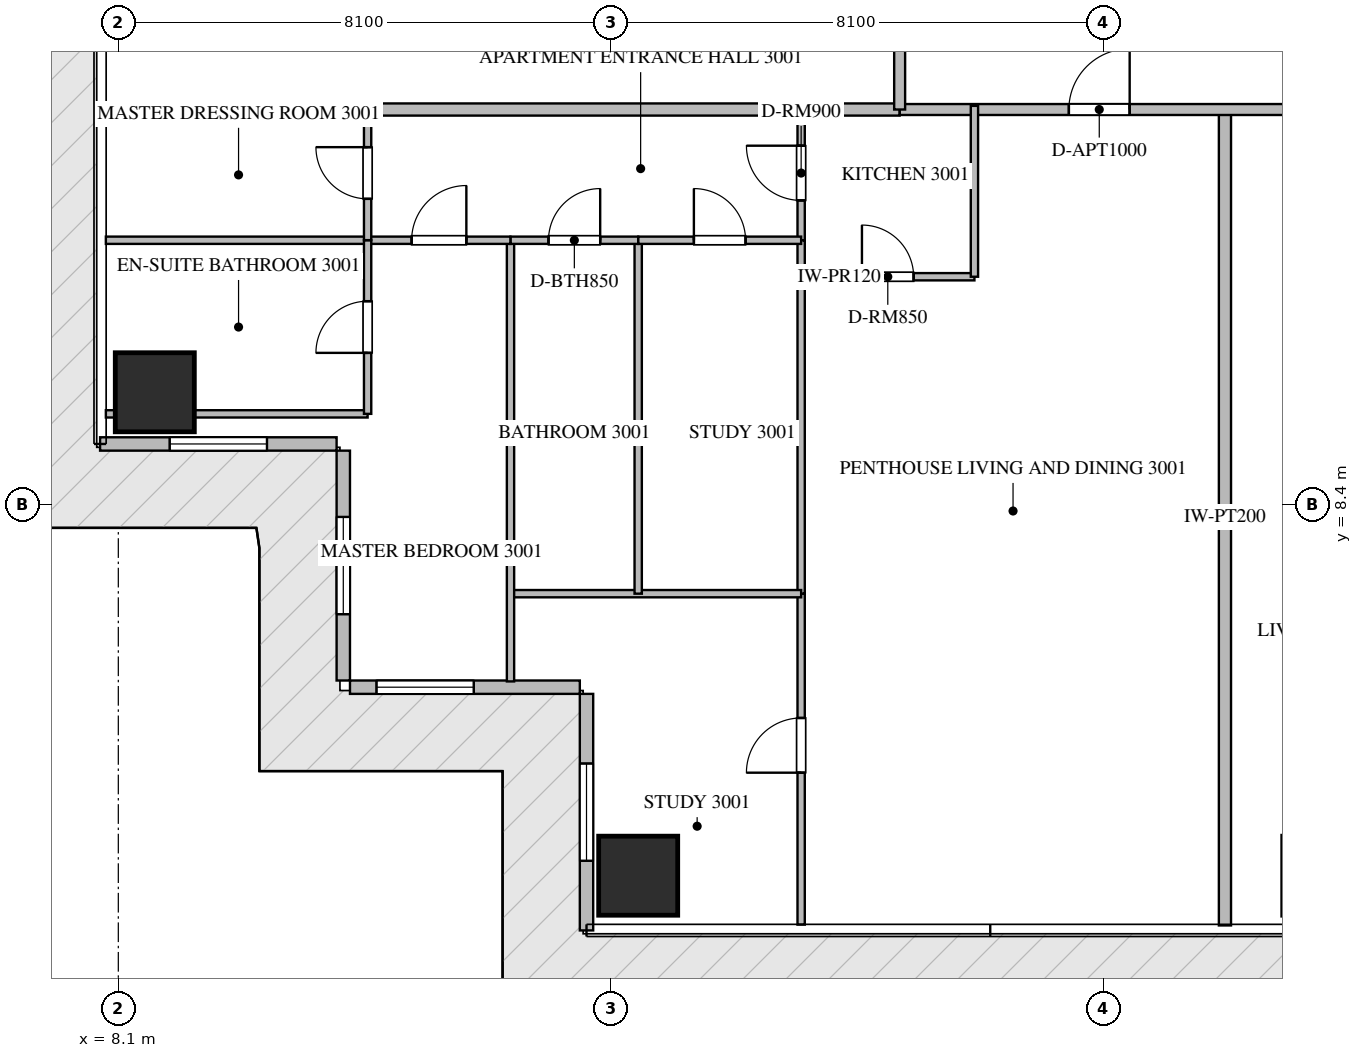
"""IFC4 building model, lengths in metres.
Left out: names, types, materials, properties, quantities, classifications, styles, units other than length and angle.
Written with IfcOpenShell. Run it as: python <this file> out.ifc"""

import sys

from ifc_helpers import new_model, si_unit, direction, frame, frame_2d, origin, origin_2d, place, context, subcontext, project, spatial, rectangle, extrude, source, transform, mapped, element, fill, save


model = new_model("IFC4")
c1 = context("Model", 3, precision=1e-05, world=origin(), true_north=direction((0.0, 1.0)))
c2 = subcontext(c1, "Body", "Model", "MODEL_VIEW")
j1 = project(units=[si_unit("LENGTHUNIT", "METRE"), si_unit("PLANEANGLEUNIT", "RADIAN")], contexts=[c1])
p1 = place(None, origin())
s1 = spatial("IfcSite", under=j1, at=p1, CompositionType="ELEMENT")
p2 = place(p1, origin())
s2 = spatial("IfcBuilding", under=s1, at=p2, CompositionType="ELEMENT")
p3 = place(p2, frame((0.0, 0.0, 123.9)))
s3 = spatial("IfcBuildingStorey", under=s2, at=p3, CompositionType="ELEMENT", Elevation=123.9)
m1 = source(origin(), c2, "Body", "SweptSolid", [
    extrude(rectangle(XDim=1.3, YDim=1.3, at=origin_2d()), origin(), (0.0, 0.0, 1.0), 3.75),
])
for number, where, z_axis, x_axis in (
    (1, (16.65, 2.3, -0.26), (0.0, 0.0, 1.0), (1.0, 0.0, 0.0)),
    (2, (8.7, 10.25, -0.26), (0.0, 0.0, 1.0), (1.0, 0.0, 0.0)),
):
    element("IfcColumn", number, at=place(p3, frame(where, z_axis=z_axis, x_axis=x_axis)), inside=s3, PredefinedType="COLUMN", context=c2, shape_type="MappedRepresentation", body=[
        mapped(m1, transform((0.0, 0.0, 0.0), scale=1.0)),
    ])
p4 = place(p3, frame((7.8, 9.4, 0.0), z_axis=(0.0, 0.0, 1.0), x_axis=(1.0, 0.0, 0.0)))
e3 = element("IfcWall", 3, at=p4, inside=s3, PredefinedType="ELEMENTEDWALL", context=c2, shape_type="SweptSolid", body=[
    extrude(rectangle(XDim=3.89, YDim=0.22, at=frame_2d((1.945, 0.0))), origin(), (0.0, 0.0, 1.0), 3.475),
])
p5 = place(p4, frame((1.145, 0.0, 0.65)))
e4 = element("IfcOpeningElement", 4, at=p5, cuts=e3, PredefinedType="OPENING", context=c2, shape_type="SweptSolid", body=[
    extrude(rectangle(XDim=1.6, YDim=2.1, at=frame_2d((0.8, 1.05))), frame((0.0, 0.12, 0.0), z_axis=(0.0, -1.0, 0.0), x_axis=(1.0, 0.0, 0.0)), (0.0, 0.0, 1.0), 0.24),
])
p6 = place(p3, frame((11.8, 9.29, 0.0), z_axis=(0.0, 0.0, 1.0), x_axis=(0.0, -1.0, 0.0)))
e5 = element("IfcWall", 5, at=p6, inside=s3, PredefinedType="ELEMENTEDWALL", context=c2, shape_type="SweptSolid", body=[
    extrude(rectangle(XDim=3.78, YDim=0.22, at=frame_2d((1.89, 0.0))), origin(), (0.0, 0.0, 1.0), 3.475),
])
p7 = place(p6, frame((1.09, 0.0, 0.65)))
e6 = element("IfcOpeningElement", 6, at=p7, cuts=e5, PredefinedType="OPENING", context=c2, shape_type="SweptSolid", body=[
    extrude(rectangle(XDim=1.6, YDim=2.1, at=frame_2d((0.8, 1.05))), frame((0.0, 0.12, 0.0), z_axis=(0.0, -1.0, 0.0), x_axis=(1.0, 0.0, 0.0)), (0.0, 0.0, 1.0), 0.24),
])
p8 = place(p3, frame((11.91, 5.4, 0.0), z_axis=(0.0, 0.0, 1.0), x_axis=(1.0, 0.0, 0.0)))
e7 = element("IfcWall", 7, at=p8, inside=s3, PredefinedType="ELEMENTEDWALL", context=c2, shape_type="SweptSolid", body=[
    extrude(rectangle(XDim=3.78, YDim=0.22, at=frame_2d((1.89, 0.0))), origin(), (0.0, 0.0, 1.0), 3.475),
])
p9 = place(p8, frame((0.436, 0.0, 0.65)))
e8 = element("IfcOpeningElement", 8, at=p9, cuts=e7, PredefinedType="OPENING", context=c2, shape_type="SweptSolid", body=[
    extrude(rectangle(XDim=1.6, YDim=2.1, at=frame_2d((0.8, 1.05))), frame((0.0, 0.12, 0.0), z_axis=(0.0, -1.0, 0.0), x_axis=(1.0, 0.0, 0.0)), (0.0, 0.0, 1.0), 0.24),
])
p10 = place(p3, frame((15.8, 5.29, 0.0), z_axis=(0.0, 0.0, 1.0), x_axis=(0.0, -1.0, 0.0)))
e9 = element("IfcWall", 9, at=p10, inside=s3, PredefinedType="ELEMENTEDWALL", context=c2, shape_type="SweptSolid", body=[
    extrude(rectangle(XDim=3.89, YDim=0.22, at=frame_2d((1.945, 0.0))), origin(), (0.0, 0.0, 1.0), 3.475),
])
p11 = place(p10, frame((1.145, 0.0, 0.65)))
e10 = element("IfcOpeningElement", 10, at=p11, cuts=e9, PredefinedType="OPENING", context=c2, shape_type="SweptSolid", body=[
    extrude(rectangle(XDim=1.6, YDim=2.1, at=frame_2d((0.8, 1.05))), frame((0.0, 0.12, 0.0), z_axis=(0.0, -1.0, 0.0), x_axis=(1.0, 0.0, 0.0)), (0.0, 0.0, 1.0), 0.24),
])
p12 = place(p3, frame((26.3, 1.482, 0.0), z_axis=(0.0, 0.0, 1.0), x_axis=(0.0, 1.0, 0.0)))
e11 = element("IfcWall", 11, at=p12, inside=s3, PredefinedType="PARTITIONING", context=c2, shape_type="SweptSolid", body=[
    extrude(rectangle(XDim=13.418, YDim=0.2, at=frame_2d((6.709, 0.0))), origin(), (0.0, 0.0, 1.0), 3.49),
])
p13 = place(p3, frame((7.882, 14.9, 0.0), z_axis=(0.0, 0.0, 1.0), x_axis=(1.0, 0.0, 0.0)))
e12 = element("IfcWall", 12, at=p13, inside=s3, PredefinedType="PARTITIONING", context=c2, shape_type="SweptSolid", body=[
    extrude(rectangle(XDim=13.068, YDim=0.2, at=frame_2d((6.534, 0.0))), origin(), (0.0, 0.0, 1.0), 3.49),
])
p14 = place(p3, frame((20.952, 14.9, 0.0), z_axis=(0.0, 0.0, 1.0), x_axis=(1.0, 0.0, 0.0)))
e13 = element("IfcWall", 13, at=p14, inside=s3, PredefinedType="PARTITIONING", context=c2, shape_type="SweptSolid", body=[
    extrude(rectangle(XDim=22.896, YDim=0.18, at=frame_2d((11.448, 0.0))), origin(), (0.0, 0.0, 1.0), 3.49),
])
p15 = place(p14, frame((2.781, 0.0, 0.0)))
e14 = element("IfcOpeningElement", 14, at=p15, cuts=e13, PredefinedType="OPENING", context=c2, shape_type="SweptSolid", body=[
    extrude(rectangle(XDim=1.0, YDim=2.15, at=frame_2d((0.5, 1.075))), frame((0.0, 0.1, 0.0), z_axis=(0.0, -1.0, 0.0), x_axis=(1.0, 0.0, 0.0)), (0.0, 0.0, 1.0), 0.2),
])
p16 = place(p14, frame((7.16, 0.0, 0.0)))
e15 = element("IfcOpeningElement", 15, at=p16, cuts=e13, PredefinedType="OPENING", context=c2, shape_type="SweptSolid", body=[
    extrude(rectangle(XDim=1.0, YDim=2.15, at=frame_2d((0.5, 1.075))), frame((0.0, 0.1, 0.0), z_axis=(0.0, -1.0, 0.0), x_axis=(1.0, 0.0, 0.0)), (0.0, 0.0, 1.0), 0.2),
])
p17 = place(p14, frame((19.115, 0.0, 0.0)))
e16 = element("IfcOpeningElement", 16, at=p17, cuts=e13, PredefinedType="OPENING", context=c2, shape_type="SweptSolid", body=[
    extrude(rectangle(XDim=1.0, YDim=2.15, at=frame_2d((0.5, 1.075))), frame((0.0, 0.1, 0.0), z_axis=(0.0, -1.0, 0.0), x_axis=(1.0, 0.0, 0.0)), (0.0, 0.0, 1.0), 0.2),
])
p18 = place(p3, frame((20.95, 14.9, 0.0), z_axis=(0.0, 0.0, 1.0), x_axis=(0.0, 1.0, 0.0)))
e17 = element("IfcWall", 17, at=p18, inside=s3, PredefinedType="PARTITIONING", context=c2, shape_type="SweptSolid", body=[
    extrude(rectangle(XDim=18.7, YDim=0.18, at=frame_2d((9.35, 0.0))), origin(), (0.0, 0.0, 1.0), 3.49),
])
p19 = place(p18, frame((1.805, 0.0, 0.0)))
e18 = element("IfcOpeningElement", 18, at=p19, cuts=e17, PredefinedType="OPENING", context=c2, shape_type="SweptSolid", body=[
    extrude(rectangle(XDim=1.0, YDim=2.15, at=frame_2d((0.5, 1.075))), frame((0.0, 0.1, 0.0), z_axis=(0.0, -1.0, 0.0), x_axis=(1.0, 0.0, 0.0)), (0.0, 0.0, 1.0), 0.2),
])
p20 = place(p18, frame((10.602, 0.0, 0.0)))
e19 = element("IfcOpeningElement", 19, at=p20, cuts=e17, PredefinedType="OPENING", context=c2, shape_type="SweptSolid", body=[
    extrude(rectangle(XDim=1.0, YDim=2.15, at=frame_2d((0.5, 1.075))), frame((0.0, 0.1, 0.0), z_axis=(0.0, -1.0, 0.0), x_axis=(1.0, 0.0, 0.0)), (0.0, 0.0, 1.0), 0.2),
])
p21 = place(p3, frame((19.33, 12.15, 0.0), z_axis=(0.0, 0.0, 1.0), x_axis=(1.0, 0.0, 0.0)))
e20 = element("IfcWall", 20, at=p21, inside=s3, PredefinedType="PARTITIONING", context=c2, shape_type="SweptSolid", body=[
    extrude(rectangle(XDim=2.85, YDim=0.12, at=frame_2d((1.425, 0.0))), origin(), (0.0, 0.0, 1.0), 3.49),
])
p22 = place(p21, frame((1.0, 0.0, 0.0)))
e21 = element("IfcOpeningElement", 21, at=p22, cuts=e20, PredefinedType="OPENING", context=c2, shape_type="SweptSolid", body=[
    extrude(rectangle(XDim=0.85, YDim=2.1, at=frame_2d((0.425, 1.05))), frame((0.0, 0.07, 0.0), z_axis=(0.0, -1.0, 0.0), x_axis=(1.0, 0.0, 0.0)), (0.0, 0.0, 1.0), 0.14),
])
p23 = place(p3, frame((22.18, 12.15, 0.0), z_axis=(0.0, 0.0, 1.0), x_axis=(0.0, 1.0, 0.0)))
e22 = element("IfcWall", 22, at=p23, inside=s3, PredefinedType="PARTITIONING", context=c2, shape_type="SweptSolid", body=[
    extrude(rectangle(XDim=2.81, YDim=0.12, at=frame_2d((1.405, 0.0))), origin(), (0.0, 0.0, 1.0), 3.49),
])
p24 = place(p3, frame((19.33, 12.75, 0.0), z_axis=(0.0, 0.0, 1.0), x_axis=(0.0, 1.0, 0.0)))
e23 = element("IfcWall", 23, at=p24, inside=s3, PredefinedType="PARTITIONING", context=c2, shape_type="SweptSolid", body=[
    extrude(rectangle(XDim=2.21, YDim=0.12, at=frame_2d((1.105, 0.0))), origin(), (0.0, 0.0, 1.0), 3.49),
])
p25 = place(p24, frame((0.655, 0.0, 0.0)))
e24 = element("IfcOpeningElement", 24, at=p25, cuts=e23, PredefinedType="OPENING", context=c2, shape_type="SweptSolid", body=[
    extrude(rectangle(XDim=0.9, YDim=2.1, at=frame_2d((0.45, 1.05))), frame((0.0, 0.07, 0.0), z_axis=(0.0, -1.0, 0.0), x_axis=(1.0, 0.0, 0.0)), (0.0, 0.0, 1.0), 0.14),
])
p26 = place(p3, frame((19.33, 1.495, 0.0), z_axis=(0.0, 0.0, 1.0), x_axis=(0.0, 1.0, 0.0)))
e25 = element("IfcWall", 25, at=p26, inside=s3, PredefinedType="PARTITIONING", context=c2, shape_type="SweptSolid", body=[
    extrude(rectangle(XDim=5.443, YDim=0.12, at=frame_2d((2.721, 0.0))), origin(), (0.0, 0.0, 1.0), 3.49),
])
p27 = place(p26, frame((2.499, 0.0, 0.0)))
e26 = element("IfcOpeningElement", 26, at=p27, cuts=e25, PredefinedType="OPENING", context=c2, shape_type="SweptSolid", body=[
    extrude(rectangle(XDim=0.9, YDim=2.1, at=frame_2d((0.45, 1.05))), frame((0.0, 0.07, 0.0), z_axis=(0.0, -1.0, 0.0), x_axis=(1.0, 0.0, 0.0)), (0.0, 0.0, 1.0), 0.14),
])
p28 = place(p3, frame((19.33, 6.94, 0.0), z_axis=(0.0, 0.0, 1.0), x_axis=(0.0, 1.0, 0.0)))
e27 = element("IfcWall", 27, at=p28, inside=s3, PredefinedType="PARTITIONING", context=c2, shape_type="SweptSolid", body=[
    extrude(rectangle(XDim=5.808, YDim=0.12, at=frame_2d((2.904, 0.0))), origin(), (0.0, 0.0, 1.0), 3.49),
])
p29 = place(p3, frame((14.55, 6.938, 0.0), z_axis=(0.0, 0.0, 1.0), x_axis=(1.0, 0.0, 0.0)))
e28 = element("IfcWall", 28, at=p29, inside=s3, PredefinedType="PARTITIONING", context=c2, shape_type="SweptSolid", body=[
    extrude(rectangle(XDim=4.78, YDim=0.12, at=frame_2d((2.39, 0.0))), origin(), (0.0, 0.0, 1.0), 3.49),
])
p30 = place(p3, frame((14.55, 5.495, 0.0), z_axis=(0.0, 0.0, 1.0), x_axis=(0.0, 1.0, 0.0)))
e29 = element("IfcWall", 29, at=p30, inside=s3, PredefinedType="PARTITIONING", context=c2, shape_type="SweptSolid", body=[
    extrude(rectangle(XDim=7.255, YDim=0.12, at=frame_2d((3.627, 0.0))), origin(), (0.0, 0.0, 1.0), 3.49),
])
p31 = place(p3, frame((16.65, 6.938, 0.0), z_axis=(0.0, 0.0, 1.0), x_axis=(0.0, 1.0, 0.0)))
e30 = element("IfcWall", 30, at=p31, inside=s3, PredefinedType="PARTITIONING", context=c2, shape_type="SweptSolid", body=[
    extrude(rectangle(XDim=5.812, YDim=0.12, at=frame_2d((2.906, 0.0))), origin(), (0.0, 0.0, 1.0), 2.972),
])
p32 = place(p3, frame((14.55, 12.75, 0.0), z_axis=(0.0, 0.0, 1.0), x_axis=(1.0, 0.0, 0.0)))
e31 = element("IfcWall", 31, at=p32, inside=s3, PredefinedType="PARTITIONING", context=c2, shape_type="SweptSolid", body=[
    extrude(rectangle(XDim=2.1, YDim=0.12, at=frame_2d((1.05, 0.0))), origin(), (0.0, 0.0, 1.0), 3.49),
])
p33 = place(p32, frame((0.625, 0.0, 0.0)))
e32 = element("IfcOpeningElement", 32, at=p33, cuts=e31, PredefinedType="OPENING", context=c2, shape_type="SweptSolid", body=[
    extrude(rectangle(XDim=0.85, YDim=2.1, at=frame_2d((0.425, 1.05))), frame((0.0, 0.07, 0.0), z_axis=(0.0, -1.0, 0.0), x_axis=(1.0, 0.0, 0.0)), (0.0, 0.0, 1.0), 0.14),
])
p34 = place(p3, frame((16.652, 12.75, 0.0), z_axis=(0.0, 0.0, 1.0), x_axis=(1.0, 0.0, 0.0)))
e33 = element("IfcWall", 33, at=p34, inside=s3, PredefinedType="PARTITIONING", context=c2, shape_type="SweptSolid", body=[
    extrude(rectangle(XDim=2.678, YDim=0.12, at=frame_2d((1.339, 0.0))), origin(), (0.0, 0.0, 1.0), 3.49),
])
p35 = place(p34, frame((0.914, 0.0, 0.0)))
e34 = element("IfcOpeningElement", 34, at=p35, cuts=e33, PredefinedType="OPENING", context=c2, shape_type="SweptSolid", body=[
    extrude(rectangle(XDim=0.85, YDim=2.1, at=frame_2d((0.425, 1.05))), frame((0.0, 0.07, 0.0), z_axis=(0.0, -1.0, 0.0), x_axis=(1.0, 0.0, 0.0)), (0.0, 0.0, 1.0), 0.14),
])
p36 = place(p3, frame((12.2, 12.75, 0.0), z_axis=(0.0, 0.0, 1.0), x_axis=(1.0, 0.0, 0.0)))
e35 = element("IfcWall", 35, at=p36, inside=s3, PredefinedType="PARTITIONING", context=c2, shape_type="SweptSolid", body=[
    extrude(rectangle(XDim=2.348, YDim=0.12, at=frame_2d((1.174, 0.0))), origin(), (0.0, 0.0, 1.0), 3.49),
])
p37 = place(p36, frame((0.724, 0.0, 0.0)))
e36 = element("IfcOpeningElement", 36, at=p37, cuts=e35, PredefinedType="OPENING", context=c2, shape_type="SweptSolid", body=[
    extrude(rectangle(XDim=0.9, YDim=2.1, at=frame_2d((0.45, 1.05))), frame((0.0, 0.07, 0.0), z_axis=(0.0, -1.0, 0.0), x_axis=(1.0, 0.0, 0.0)), (0.0, 0.0, 1.0), 0.14),
])
p38 = place(p3, frame((7.895, 9.895, 0.0), z_axis=(0.0, 0.0, 1.0), x_axis=(1.0, 0.0, 0.0)))
e37 = element("IfcWall", 37, at=p38, inside=s3, PredefinedType="PARTITIONING", context=c2, shape_type="SweptSolid", body=[
    extrude(rectangle(XDim=4.305, YDim=0.12, at=frame_2d((2.152, 0.0))), origin(), (0.0, 0.0, 1.0), 3.49),
])
p39 = place(p3, frame((7.895, 12.75, 0.0), z_axis=(0.0, 0.0, 1.0), x_axis=(1.0, 0.0, 0.0)))
e38 = element("IfcWall", 38, at=p39, inside=s3, PredefinedType="PARTITIONING", context=c2, shape_type="SweptSolid", body=[
    extrude(rectangle(XDim=4.303, YDim=0.12, at=frame_2d((2.151, 0.0))), origin(), (0.0, 0.0, 1.0), 3.49),
])
p40 = place(p3, frame((12.2, 9.895, 0.0), z_axis=(0.0, 0.0, 1.0), x_axis=(0.0, 1.0, 0.0)))
e39 = element("IfcWall", 39, at=p40, inside=s3, PredefinedType="PARTITIONING", context=c2, shape_type="SweptSolid", body=[
    extrude(rectangle(XDim=2.855, YDim=0.12, at=frame_2d((1.427, 0.0))), origin(), (0.0, 0.0, 1.0), 3.49),
])
p41 = place(p40, frame((1.003, 0.0, 0.0)))
e40 = element("IfcOpeningElement", 40, at=p41, cuts=e39, PredefinedType="OPENING", context=c2, shape_type="SweptSolid", body=[
    extrude(rectangle(XDim=0.85, YDim=2.1, at=frame_2d((0.425, 1.05))), frame((0.0, 0.07, 0.0), z_axis=(0.0, -1.0, 0.0), x_axis=(1.0, 0.0, 0.0)), (0.0, 0.0, 1.0), 0.14),
])
p42 = place(p3, frame((12.2, 12.752, 0.0), z_axis=(0.0, 0.0, 1.0), x_axis=(0.0, 1.0, 0.0)))
e41 = element("IfcWall", 41, at=p42, inside=s3, PredefinedType="PARTITIONING", context=c2, shape_type="SweptSolid", body=[
    extrude(rectangle(XDim=2.208, YDim=0.12, at=frame_2d((1.104, 0.0))), origin(), (0.0, 0.0, 1.0), 3.49),
])
p43 = place(p42, frame((0.679, 0.0, 0.0)))
e42 = element("IfcOpeningElement", 42, at=p43, cuts=e41, PredefinedType="OPENING", context=c2, shape_type="SweptSolid", body=[
    extrude(rectangle(XDim=0.85, YDim=2.1, at=frame_2d((0.425, 1.05))), frame((0.0, 0.07, 0.0), z_axis=(0.0, -1.0, 0.0), x_axis=(1.0, 0.0, 0.0)), (0.0, 0.0, 1.0), 0.14),
])
m2 = source(origin(), c2, "Body", "SweptSolid", [
    extrude(rectangle(XDim=1.6, YDim=2.1, at=frame_2d((0.8, 1.05))), frame((0.0, 0.03, 0.0), z_axis=(0.0, -1.0, 0.0), x_axis=(1.0, 0.0, 0.0)), (0.0, 0.0, 1.0), 0.06),
])
p44 = place(p5, origin())
e43 = element("IfcWindow", 43, at=p44, inside=s3, PartitioningType="SINGLE_PANEL", PredefinedType="WINDOW", context=c2, shape_type="MappedRepresentation", body=[
    mapped(m2, transform((0.0, 0.0, 0.0), scale=1.0)),
])
fill(e4, e43)
p45 = place(p7, origin())
e44 = element("IfcWindow", 44, at=p45, inside=s3, PartitioningType="SINGLE_PANEL", PredefinedType="WINDOW", context=c2, shape_type="MappedRepresentation", body=[
    mapped(m2, transform((0.0, 0.0, 0.0), scale=1.0)),
])
fill(e6, e44)
p46 = place(p9, origin())
e45 = element("IfcWindow", 45, at=p46, inside=s3, PartitioningType="SINGLE_PANEL", PredefinedType="WINDOW", context=c2, shape_type="MappedRepresentation", body=[
    mapped(m2, transform((0.0, 0.0, 0.0), scale=1.0)),
])
fill(e8, e45)
p47 = place(p11, origin())
e46 = element("IfcWindow", 46, at=p47, inside=s3, PartitioningType="SINGLE_PANEL", PredefinedType="WINDOW", context=c2, shape_type="MappedRepresentation", body=[
    mapped(m2, transform((0.0, 0.0, 0.0), scale=1.0)),
])
fill(e10, e46)
m3 = source(origin(), c2, "Body", "SweptSolid", [
    extrude(rectangle(XDim=1.0, YDim=2.15, at=frame_2d((0.5, 1.075))), frame((0.0, 0.025, 0.0), z_axis=(0.0, -1.0, 0.0), x_axis=(1.0, 0.0, 0.0)), (0.0, 0.0, 1.0), 0.05),
])
p48 = place(p15, origin())
e47 = element("IfcDoor", 47, at=p48, inside=s3, OperationType="SINGLE_SWING_RIGHT", PredefinedType="DOOR", context=c2, shape_type="MappedRepresentation", body=[
    mapped(m3, transform((0.0, 0.0, 0.0), scale=1.0)),
])
fill(e14, e47)
m4 = source(origin(), c2, "Body", "SweptSolid", [
    extrude(rectangle(XDim=0.85, YDim=2.1, at=frame_2d((0.425, 1.05))), frame((0.0, 0.025, 0.0), z_axis=(0.0, -1.0, 0.0), x_axis=(1.0, 0.0, 0.0)), (0.0, 0.0, 1.0), 0.05),
])
p49 = place(p22, origin())
e48 = element("IfcDoor", 48, at=p49, inside=s3, OperationType="SINGLE_SWING_LEFT", PredefinedType="DOOR", context=c2, shape_type="MappedRepresentation", body=[
    mapped(m4, transform((0.0, 0.0, 0.0), scale=1.0)),
])
fill(e21, e48)
m5 = source(origin(), c2, "Body", "SweptSolid", [
    extrude(rectangle(XDim=0.9, YDim=2.1, at=frame_2d((0.45, 1.05))), frame((0.0, 0.025, 0.0), z_axis=(0.0, -1.0, 0.0), x_axis=(1.0, 0.0, 0.0)), (0.0, 0.0, 1.0), 0.05),
])
p50 = place(p25, origin())
e49 = element("IfcDoor", 49, at=p50, inside=s3, OperationType="SINGLE_SWING_RIGHT", PredefinedType="DOOR", context=c2, shape_type="MappedRepresentation", body=[
    mapped(m5, transform((0.0, 0.0, 0.0), scale=1.0)),
])
fill(e24, e49)
p51 = place(p27, origin())
e50 = element("IfcDoor", 50, at=p51, inside=s3, OperationType="SINGLE_SWING_LEFT", PredefinedType="DOOR", context=c2, shape_type="MappedRepresentation", body=[
    mapped(m5, transform((0.0, 0.0, 0.0), scale=1.0)),
])
fill(e26, e50)
p52 = place(p33, origin())
e51 = element("IfcDoor", 51, at=p52, inside=s3, OperationType="SINGLE_SWING_RIGHT", PredefinedType="DOOR", context=c2, shape_type="MappedRepresentation", body=[
    mapped(m4, transform((0.0, 0.0, 0.0), scale=1.0)),
])
fill(e32, e51)
p53 = place(p35, origin())
e52 = element("IfcDoor", 52, at=p53, inside=s3, OperationType="SINGLE_SWING_LEFT", PredefinedType="DOOR", context=c2, shape_type="MappedRepresentation", body=[
    mapped(m4, transform((0.0, 0.0, 0.0), scale=1.0)),
])
fill(e34, e52)
p54 = place(p37, origin())
e53 = element("IfcDoor", 53, at=p54, inside=s3, OperationType="SINGLE_SWING_RIGHT", PredefinedType="DOOR", context=c2, shape_type="MappedRepresentation", body=[
    mapped(m5, transform((0.0, 0.0, 0.0), scale=1.0)),
])
fill(e36, e53)
p55 = place(p41, origin())
e54 = element("IfcDoor", 54, at=p55, inside=s3, OperationType="SINGLE_SWING_LEFT", PredefinedType="DOOR", context=c2, shape_type="MappedRepresentation", body=[
    mapped(m4, transform((0.0, 0.0, 0.0), scale=1.0)),
])
fill(e40, e54)
p56 = place(p43, origin())
e55 = element("IfcDoor", 55, at=p56, inside=s3, OperationType="SINGLE_SWING_RIGHT", PredefinedType="DOOR", context=c2, shape_type="MappedRepresentation", body=[
    mapped(m4, transform((0.0, 0.0, 0.0), scale=1.0)),
])
fill(e42, e55)
save(model, sys.argv[1])
